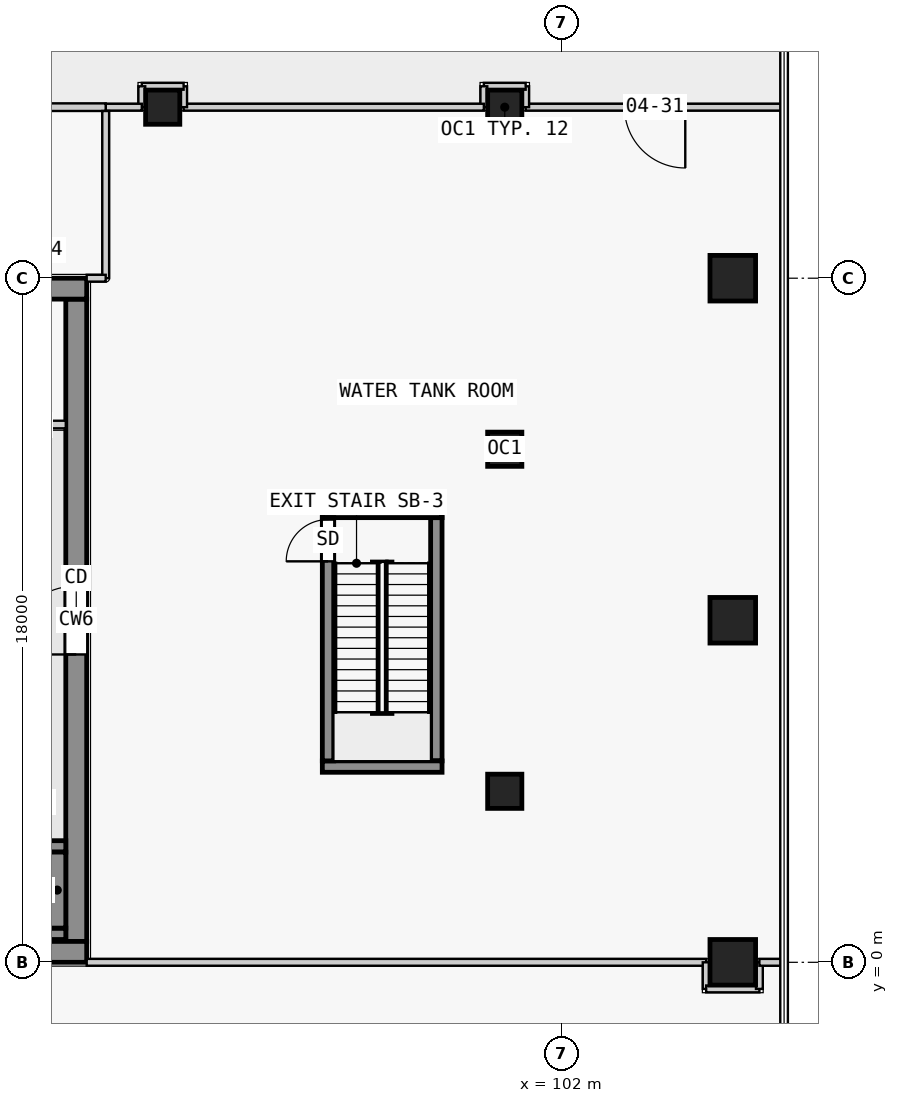
"""IFC4 building model, lengths in metres.
Left out: names, types, materials, properties, quantities, classifications, styles, units other than length and angle.
Written with IfcOpenShell. Run it as: python <this file> out.ifc"""

import sys

from ifc_helpers import new_model, si_unit, direction, frame, frame_2d, origin, origin_2d, place, context, subcontext, project, spatial, rectangle, extrude, element, fill, save


model = new_model("IFC4")
c1 = context("Model", 3, precision=1e-05, world=origin(), true_north=direction((0.0, 1.0)))
c2 = subcontext(c1, "Body", "Model", "MODEL_VIEW")
j1 = project(units=[si_unit("LENGTHUNIT", "METRE"), si_unit("PLANEANGLEUNIT", "RADIAN")], contexts=[c1])
p1 = place(None, origin())
s1 = spatial("IfcSite", under=j1, at=p1, CompositionType="ELEMENT")
p2 = place(p1, origin())
s2 = spatial("IfcBuilding", under=s1, at=p2, CompositionType="ELEMENT")
p3 = place(p2, frame((0.0, 0.0, 21.8)))
s3 = spatial("IfcBuildingStorey", under=s2, at=p3, CompositionType="ELEMENT", Elevation=21.8)
for number, where, z_axis, x_axis in (
    (1, (106.5, 0.0, 0.0), (0.0, 0.0, 1.0), (1.0, 0.0, 0.0)),
    (2, (106.5, 9.0, 0.0), (0.0, 0.0, 1.0), (1.0, 0.0, 0.0)),
    (3, (106.5, 18.0, 0.0), (0.0, 0.0, 1.0), (1.0, 0.0, 0.0)),
):
    element("IfcColumn", number, at=place(p3, frame(where, z_axis=z_axis, x_axis=x_axis)), inside=s3, PredefinedType="COLUMN", context=c2, shape_type="SweptSolid", body=[
        extrude(rectangle(XDim=1.2, YDim=1.2, at=origin_2d()), origin(), (0.0, 0.0, 1.0), 5.0),
    ])
for number, where, z_axis, x_axis in (
    (4, (100.5, 4.5, 0.0), (0.0, 0.0, 1.0), (1.0, 0.0, 0.0)),
    (5, (100.5, 13.5, 0.0), (0.0, 0.0, 1.0), (1.0, 0.0, 0.0)),
    (6, (100.5, 22.5, 0.0), (0.0, 0.0, 1.0), (1.0, 0.0, 0.0)),
    (7, (91.5, 22.5, 0.0), (0.0, 0.0, 1.0), (1.0, 0.0, 0.0)),
):
    element("IfcColumn", number, at=place(p3, frame(where, z_axis=z_axis, x_axis=x_axis)), inside=s3, PredefinedType="COLUMN", context=c2, shape_type="SweptSolid", body=[
        extrude(rectangle(XDim=0.9, YDim=0.9, at=origin_2d()), origin(), (0.0, 0.0, 1.0), 5.0),
    ])
for number, where, z_axis, x_axis in (
    (8, (75.0, 0.275, 0.0), (0.0, 0.0, 1.0), (1.0, 0.0, 0.0)),
    (9, (75.0, 17.725, 0.0), (0.0, 0.0, 1.0), (1.0, 0.0, 0.0)),
):
    element("IfcWall", number, at=place(p3, frame(where, z_axis=z_axis, x_axis=x_axis)), inside=s3, PredefinedType="SHEAR", context=c2, shape_type="SweptSolid", body=[
        extrude(rectangle(XDim=14.5, YDim=0.55, at=frame_2d((7.25, 0.0))), origin(), (0.0, 0.0, 1.0), 4.5),
    ])
p4 = place(p3, frame((89.225, 0.55, 0.0), z_axis=(0.0, 0.0, 1.0), x_axis=(0.0, 1.0, 0.0)))
e10 = element("IfcWall", 10, at=p4, inside=s3, PredefinedType="SHEAR", context=c2, shape_type="SweptSolid", body=[
    extrude(rectangle(XDim=16.9, YDim=0.55, at=frame_2d((8.45, 0.0))), origin(), (0.0, 0.0, 1.0), 4.5),
])
p5 = place(p4, frame((7.55, 0.0, 0.0)))
e11 = element("IfcOpeningElement", 11, at=p5, cuts=e10, PredefinedType="OPENING", context=c2, shape_type="SweptSolid", body=[
    extrude(rectangle(XDim=1.8, YDim=2.1, at=frame_2d((0.9, 1.05))), frame((0.0, 0.285, 0.0), z_axis=(0.0, -1.0, 0.0), x_axis=(1.0, 0.0, 0.0)), (0.0, 0.0, 1.0), 0.57),
])
p6 = place(p3, frame((81.3, 0.75, 0.0), z_axis=(0.0, 0.0, 1.0), x_axis=(1.0, 0.0, 0.0)))
e12 = element("IfcWall", 12, at=p6, inside=s3, PredefinedType="SHEAR", context=c2, shape_type="SweptSolid", body=[
    extrude(rectangle(XDim=7.65, YDim=0.3, at=frame_2d((3.825, 0.0))), origin(), (0.0, 0.0, 1.0), 4.5),
])
p7 = place(p3, frame((88.725, 0.9, 0.0), z_axis=(0.0, 0.0, 1.0), x_axis=(0.0, 1.0, 0.0)))
e13 = element("IfcWall", 13, at=p7, inside=s3, PredefinedType="SHEAR", context=c2, shape_type="SweptSolid", body=[
    extrude(rectangle(XDim=2.0, YDim=0.45, at=frame_2d((1.0, 0.0))), origin(), (0.0, 0.0, 1.0), 4.5),
])
p8 = place(p3, frame((81.3, 3.05, 0.0), z_axis=(0.0, 0.0, 1.0), x_axis=(1.0, 0.0, 0.0)))
e14 = element("IfcWall", 14, at=p8, inside=s3, PredefinedType="SHEAR", context=c2, shape_type="SweptSolid", body=[
    extrude(rectangle(XDim=7.65, YDim=0.3, at=frame_2d((3.825, 0.0))), origin(), (0.0, 0.0, 1.0), 4.5),
])
p9 = place(p8, frame((0.55, 0.0, 0.0)))
e15 = element("IfcOpeningElement", 15, at=p9, cuts=e14, PredefinedType="OPENING", context=c2, shape_type="SweptSolid", body=[
    extrude(rectangle(XDim=1.1, YDim=2.1, at=frame_2d((0.55, 1.05))), frame((0.0, 0.16, 0.0), z_axis=(0.0, -1.0, 0.0), x_axis=(1.0, 0.0, 0.0)), (0.0, 0.0, 1.0), 0.32),
])
p10 = place(p8, frame((3.05, 0.0, 0.0)))
e16 = element("IfcOpeningElement", 16, at=p10, cuts=e14, PredefinedType="OPENING", context=c2, shape_type="SweptSolid", body=[
    extrude(rectangle(XDim=1.1, YDim=2.1, at=frame_2d((0.55, 1.05))), frame((0.0, 0.16, 0.0), z_axis=(0.0, -1.0, 0.0), x_axis=(1.0, 0.0, 0.0)), (0.0, 0.0, 1.0), 0.32),
])
p11 = place(p8, frame((5.55, 0.0, 0.0)))
e17 = element("IfcOpeningElement", 17, at=p11, cuts=e14, PredefinedType="OPENING", context=c2, shape_type="SweptSolid", body=[
    extrude(rectangle(XDim=1.1, YDim=2.1, at=frame_2d((0.55, 1.05))), frame((0.0, 0.16, 0.0), z_axis=(0.0, -1.0, 0.0), x_axis=(1.0, 0.0, 0.0)), (0.0, 0.0, 1.0), 0.32),
])
p12 = place(p3, frame((95.85, 5.3, 0.0), z_axis=(0.0, 0.0, 1.0), x_axis=(0.0, 1.0, 0.0)))
e18 = element("IfcWall", 18, at=p12, inside=s3, PredefinedType="SHEAR", context=c2, shape_type="SweptSolid", body=[
    extrude(rectangle(XDim=6.4, YDim=0.3, at=frame_2d((3.2, 0.0))), origin(), (0.0, 0.0, 1.0), 4.5),
])
p13 = place(p12, frame((5.25, 0.0, 0.0)))
e19 = element("IfcOpeningElement", 19, at=p13, cuts=e18, PredefinedType="OPENING", context=c2, shape_type="SweptSolid", body=[
    extrude(rectangle(XDim=1.1, YDim=2.1, at=frame_2d((0.55, 1.05))), frame((0.0, 0.16, 0.0), z_axis=(0.0, -1.0, 0.0), x_axis=(1.0, 0.0, 0.0)), (0.0, 0.0, 1.0), 0.32),
])
p14 = place(p3, frame((98.7, 5.3, 0.0), z_axis=(0.0, 0.0, 1.0), x_axis=(0.0, 1.0, 0.0)))
e20 = element("IfcWall", 20, at=p14, inside=s3, PredefinedType="SHEAR", context=c2, shape_type="SweptSolid", body=[
    extrude(rectangle(XDim=6.4, YDim=0.3, at=frame_2d((3.2, 0.0))), origin(), (0.0, 0.0, 1.0), 4.5),
])
for number, where, z_axis, x_axis in (
    (21, (95.7, 5.15, 0.0), (0.0, 0.0, 1.0), (1.0, 0.0, 0.0)),
    (22, (95.7, 11.85, 0.0), (0.0, 0.0, 1.0), (1.0, 0.0, 0.0)),
):
    element("IfcWall", number, at=place(p3, frame(where, z_axis=z_axis, x_axis=x_axis)), inside=s3, PredefinedType="SHEAR", context=c2, shape_type="SweptSolid", body=[
        extrude(rectangle(XDim=3.15, YDim=0.3, at=frame_2d((1.575, 0.0))), origin(), (0.0, 0.0, 1.0), 4.5),
    ])
p15 = place(p3, frame((85.5, 14.15, 0.0), z_axis=(0.0, 0.0, 1.0), x_axis=(1.0, 0.0, 0.0)))
e23 = element("IfcWall", 23, at=p15, inside=s3, PredefinedType="PARTITIONING", context=c2, shape_type="SweptSolid", body=[
    extrude(rectangle(XDim=3.45, YDim=0.2, at=frame_2d((1.725, 0.0))), origin(), (0.0, 0.0, 1.0), 4.5),
])
p16 = place(p15, frame((0.55, 0.0, 0.0)))
e24 = element("IfcOpeningElement", 24, at=p16, cuts=e23, PredefinedType="OPENING", context=c2, shape_type="SweptSolid", body=[
    extrude(rectangle(XDim=0.9, YDim=2.1, at=frame_2d((0.45, 1.05))), frame((0.0, 0.11, 0.0), z_axis=(0.0, -1.0, 0.0), x_axis=(1.0, 0.0, 0.0)), (0.0, 0.0, 1.0), 0.22),
])
p17 = place(p15, frame((2.125, 0.0, 0.0)))
e25 = element("IfcOpeningElement", 25, at=p17, cuts=e23, PredefinedType="OPENING", context=c2, shape_type="SweptSolid", body=[
    extrude(rectangle(XDim=0.9, YDim=2.1, at=frame_2d((0.45, 1.05))), frame((0.0, 0.11, 0.0), z_axis=(0.0, -1.0, 0.0), x_axis=(1.0, 0.0, 0.0)), (0.0, 0.0, 1.0), 0.22),
])
p18 = place(p3, frame((107.85, 22.5, 0.0), z_axis=(0.0, 0.0, 1.0), x_axis=(-1.0, 0.0, 0.0)))
e26 = element("IfcWall", 26, at=p18, inside=s3, PredefinedType="PARTITIONING", context=c2, shape_type="SweptSolid", body=[
    extrude(rectangle(XDim=6.8, YDim=0.18, at=frame_2d((3.4, 0.0))), origin(), (0.0, 0.0, 1.0), 4.5),
])
p19 = place(p18, frame((2.6, 0.0, 0.0)))
e27 = element("IfcOpeningElement", 27, at=p19, cuts=e26, PredefinedType="OPENING", context=c2, shape_type="SweptSolid", body=[
    extrude(rectangle(XDim=1.6, YDim=2.4, at=frame_2d((0.8, 1.2))), frame((0.0, 0.1, 0.0), z_axis=(0.0, -1.0, 0.0), x_axis=(1.0, 0.0, 0.0)), (0.0, 0.0, 1.0), 0.2),
])
p20 = place(p3, frame((101.05, 22.5, 0.0), z_axis=(0.0, 0.0, 1.0), x_axis=(0.0, 1.0, 0.0)))
e28 = element("IfcWall", 28, at=p20, inside=s3, PredefinedType="PARTITIONING", context=c2, shape_type="SweptSolid", body=[
    extrude(rectangle(XDim=0.55, YDim=0.18, at=frame_2d((0.275, 0.0))), origin(), (0.0, 0.0, 1.0), 4.5),
])
p21 = place(p3, frame((101.05, 23.05, 0.0), z_axis=(0.0, 0.0, 1.0), x_axis=(-1.0, 0.0, 0.0)))
e29 = element("IfcWall", 29, at=p21, inside=s3, PredefinedType="PARTITIONING", context=c2, shape_type="SweptSolid", body=[
    extrude(rectangle(XDim=1.1, YDim=0.18, at=frame_2d((0.55, 0.0))), origin(), (0.0, 0.0, 1.0), 4.5),
])
p22 = place(p3, frame((99.95, 23.05, 0.0), z_axis=(0.0, 0.0, 1.0), x_axis=(0.0, -1.0, 0.0)))
e30 = element("IfcWall", 30, at=p22, inside=s3, PredefinedType="PARTITIONING", context=c2, shape_type="SweptSolid", body=[
    extrude(rectangle(XDim=0.55, YDim=0.18, at=frame_2d((0.275, 0.0))), origin(), (0.0, 0.0, 1.0), 3.7),
])
p23 = place(p3, frame((99.95, 22.5, 0.0), z_axis=(0.0, 0.0, 1.0), x_axis=(-1.0, 0.0, 0.0)))
e31 = element("IfcWall", 31, at=p23, inside=s3, PredefinedType="PARTITIONING", context=c2, shape_type="SweptSolid", body=[
    extrude(rectangle(XDim=7.9, YDim=0.18, at=frame_2d((3.95, 0.0))), origin(), (0.0, 0.0, 1.0), 3.7),
])
p24 = place(p3, frame((92.05, 22.5, 0.0), z_axis=(0.0, 0.0, 1.0), x_axis=(0.0, 1.0, 0.0)))
e32 = element("IfcWall", 32, at=p24, inside=s3, PredefinedType="PARTITIONING", context=c2, shape_type="SweptSolid", body=[
    extrude(rectangle(XDim=0.55, YDim=0.18, at=frame_2d((0.275, 0.0))), origin(), (0.0, 0.0, 1.0), 3.7),
])
p25 = place(p3, frame((92.05, 23.05, 0.0), z_axis=(0.0, 0.0, 1.0), x_axis=(-1.0, 0.0, 0.0)))
e33 = element("IfcWall", 33, at=p25, inside=s3, PredefinedType="PARTITIONING", context=c2, shape_type="SweptSolid", body=[
    extrude(rectangle(XDim=1.1, YDim=0.18, at=frame_2d((0.55, 0.0))), origin(), (0.0, 0.0, 1.0), 4.5),
])
p26 = place(p3, frame((90.95, 23.05, 0.0), z_axis=(0.0, 0.0, 1.0), x_axis=(0.0, -1.0, 0.0)))
e34 = element("IfcWall", 34, at=p26, inside=s3, PredefinedType="PARTITIONING", context=c2, shape_type="SweptSolid", body=[
    extrude(rectangle(XDim=0.55, YDim=0.18, at=frame_2d((0.275, 0.0))), origin(), (0.0, 0.0, 1.0), 3.7),
])
p27 = place(p3, frame((90.95, 22.5, 0.0), z_axis=(0.0, 0.0, 1.0), x_axis=(-1.0, 0.0, 0.0)))
e35 = element("IfcWall", 35, at=p27, inside=s3, PredefinedType="PARTITIONING", context=c2, shape_type="SweptSolid", body=[
    extrude(rectangle(XDim=0.95, YDim=0.18, at=frame_2d((0.475, 0.0))), origin(), (0.0, 0.0, 1.0), 3.7),
])
p28 = place(p3, frame((89.5, 0.0, 0.0), z_axis=(0.0, 0.0, 1.0), x_axis=(1.0, 0.0, 0.0)))
e36 = element("IfcWall", 36, at=p28, inside=s3, PredefinedType="PARTITIONING", context=c2, shape_type="SweptSolid", body=[
    extrude(rectangle(XDim=16.3, YDim=0.18, at=frame_2d((8.15, 0.0))), origin(), (0.0, 0.0, 1.0), 3.7),
])
p29 = place(p3, frame((105.8, 0.0, 0.0), z_axis=(0.0, 0.0, 1.0), x_axis=(0.0, -1.0, 0.0)))
e37 = element("IfcWall", 37, at=p29, inside=s3, PredefinedType="PARTITIONING", context=c2, shape_type="SweptSolid", body=[
    extrude(rectangle(XDim=0.7, YDim=0.18, at=frame_2d((0.35, 0.0))), origin(), (0.0, 0.0, 1.0), 4.5),
])
p30 = place(p3, frame((105.8, -0.7, 0.0), z_axis=(0.0, 0.0, 1.0), x_axis=(1.0, 0.0, 0.0)))
e38 = element("IfcWall", 38, at=p30, inside=s3, PredefinedType="PARTITIONING", context=c2, shape_type="SweptSolid", body=[
    extrude(rectangle(XDim=1.4, YDim=0.18, at=frame_2d((0.7, 0.0))), origin(), (0.0, 0.0, 1.0), 4.5),
])
p31 = place(p3, frame((107.2, -0.7, 0.0), z_axis=(0.0, 0.0, 1.0), x_axis=(0.0, 1.0, 0.0)))
e39 = element("IfcWall", 39, at=p31, inside=s3, PredefinedType="PARTITIONING", context=c2, shape_type="SweptSolid", body=[
    extrude(rectangle(XDim=0.7, YDim=0.18, at=frame_2d((0.35, 0.0))), origin(), (0.0, 0.0, 1.0), 4.5),
])
p32 = place(p3, frame((107.2, 0.0, 0.0), z_axis=(0.0, 0.0, 1.0), x_axis=(1.0, 0.0, 0.0)))
e40 = element("IfcWall", 40, at=p32, inside=s3, PredefinedType="PARTITIONING", context=c2, shape_type="SweptSolid", body=[
    extrude(rectangle(XDim=0.65, YDim=0.18, at=frame_2d((0.325, 0.0))), origin(), (0.0, 0.0, 1.0), 4.5),
])
p33 = place(p3, frame((90.0, 22.5, 0.0), z_axis=(0.0, 0.0, 1.0), x_axis=(-1.0, 0.0, 0.0)))
e41 = element("IfcWall", 41, at=p33, inside=s3, PredefinedType="PARTITIONING", context=c2, shape_type="SweptSolid", body=[
    extrude(rectangle(XDim=7.05, YDim=0.2, at=frame_2d((3.525, 0.0))), origin(), (0.0, 0.0, 1.0), 3.7),
])
p34 = place(p33, frame((2.6, 0.0, 0.0)))
e42 = element("IfcOpeningElement", 42, at=p34, cuts=e41, PredefinedType="OPENING", context=c2, shape_type="SweptSolid", body=[
    extrude(rectangle(XDim=1.8, YDim=2.1, at=frame_2d((0.9, 1.05))), frame((0.0, 0.11, 0.0), z_axis=(0.0, -1.0, 0.0), x_axis=(1.0, 0.0, 0.0)), (0.0, 0.0, 1.0), 0.22),
])
p35 = place(p3, frame((90.0, 22.4, 0.0), z_axis=(0.0, 0.0, 1.0), x_axis=(0.0, -1.0, 0.0)))
e43 = element("IfcWall", 43, at=p35, inside=s3, PredefinedType="PARTITIONING", context=c2, shape_type="SweptSolid", body=[
    extrude(rectangle(XDim=4.4, YDim=0.18, at=frame_2d((2.2, 0.0))), origin(), (0.0, 0.0, 1.0), 4.5),
])
p36 = place(p3, frame((90.0, 18.0, 0.0), z_axis=(0.0, 0.0, 1.0), x_axis=(-1.0, 0.0, 0.0)))
e44 = element("IfcWall", 44, at=p36, inside=s3, PredefinedType="PARTITIONING", context=c2, shape_type="SweptSolid", body=[
    extrude(rectangle(XDim=0.5, YDim=0.18, at=frame_2d((0.25, 0.0))), origin(), (0.0, 0.0, 1.0), 4.5),
])
p37 = place(p13, origin())
e45 = element("IfcDoor", 45, at=p37, inside=s3, OperationType="SINGLE_SWING_LEFT", PredefinedType="DOOR", context=c2, shape_type="SweptSolid", body=[
    extrude(rectangle(XDim=1.1, YDim=2.1, at=frame_2d((0.55, 1.05))), frame((0.0, 0.025, 0.0), z_axis=(0.0, -1.0, 0.0), x_axis=(1.0, 0.0, 0.0)), (0.0, 0.0, 1.0), 0.05),
])
fill(e19, e45)
p38 = place(p5, origin())
e46 = element("IfcDoor", 46, at=p38, inside=s3, OperationType="DOUBLE_DOOR_SINGLE_SWING", PredefinedType="DOOR", context=c2, shape_type="SweptSolid", body=[
    extrude(rectangle(XDim=1.8, YDim=2.1, at=frame_2d((0.9, 1.05))), frame((0.0, 0.025, 0.0), z_axis=(0.0, -1.0, 0.0), x_axis=(1.0, 0.0, 0.0)), (0.0, 0.0, 1.0), 0.05),
])
fill(e11, e46)
p39 = place(p19, origin())
e47 = element("IfcDoor", 47, at=p39, inside=s3, OperationType="SINGLE_SWING_LEFT", PredefinedType="DOOR", context=c2, shape_type="SweptSolid", body=[
    extrude(rectangle(XDim=1.6, YDim=2.4, at=frame_2d((0.8, 1.2))), frame((0.0, 0.025, 0.0), z_axis=(0.0, -1.0, 0.0), x_axis=(1.0, 0.0, 0.0)), (0.0, 0.0, 1.0), 0.05),
])
fill(e27, e47)
save(model, sys.argv[1])
